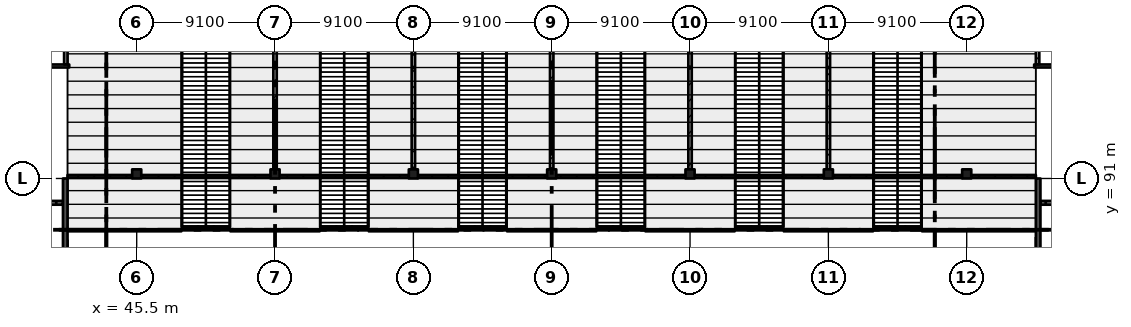
"""IFC4 building model, lengths in metres.
Left out: names, types, materials, properties, quantities, classifications, styles, units other than length and angle.
Written with IfcOpenShell. Run it as: python <this file> out.ifc"""

import sys

from ifc_helpers import new_model, si_unit, direction, frame, frame_2d, origin, origin_2d, place, context, subcontext, project, spatial, rectangle, extrude, element, fill, save


model = new_model("IFC4")
c1 = context("Model", 3, precision=1e-05, world=origin(), true_north=direction((0.0, 1.0)))
c2 = subcontext(c1, "Body", "Model", "MODEL_VIEW")
j1 = project(units=[si_unit("LENGTHUNIT", "METRE"), si_unit("PLANEANGLEUNIT", "RADIAN")], contexts=[c1])
p1 = place(None, origin())
s1 = spatial("IfcSite", under=j1, at=p1, CompositionType="ELEMENT")
p2 = place(p1, origin())
s2 = spatial("IfcBuilding", under=s1, at=p2, CompositionType="ELEMENT")
p3 = place(p2, frame((0.0, 0.0, 15.47)))
s3 = spatial("IfcBuildingStorey", under=s2, at=p3, CompositionType="ELEMENT", Elevation=15.47)
for number, where, z_axis, x_axis in (
    (1, (45.5, 91.3, 0.0), (0.0, 0.0, 1.0), (1.0, 0.0, 0.0)),
    (2, (54.6, 91.3, 0.0), (0.0, 0.0, 1.0), (1.0, 0.0, 0.0)),
    (3, (63.7, 91.3, 0.0), (0.0, 0.0, 1.0), (1.0, 0.0, 0.0)),
    (4, (72.8, 91.3, 0.0), (0.0, 0.0, 1.0), (1.0, 0.0, 0.0)),
    (5, (81.9, 91.3, 0.0), (0.0, 0.0, 1.0), (1.0, 0.0, 0.0)),
    (6, (91.0, 91.3, 0.0), (0.0, 0.0, 1.0), (1.0, 0.0, 0.0)),
    (7, (100.1, 91.3, 0.0), (0.0, 0.0, 1.0), (1.0, 0.0, 0.0)),
):
    element("IfcColumn", number, at=place(p3, frame(where, z_axis=z_axis, x_axis=x_axis)), inside=s3, PredefinedType="COLUMN", context=c2, shape_type="SweptSolid", body=[
        extrude(rectangle(XDim=0.6, YDim=0.6, at=origin_2d()), origin(), (0.0, 0.0, 1.0), 2.71),
    ])
for number, where, z_axis, x_axis in (
    (8, (40.8, 68.25, 0.0), (0.0, 0.0, 1.0), (0.0, 1.0, 0.0)),
    (9, (104.8, 68.25, 0.0), (0.0, 0.0, 1.0), (0.0, 1.0, 0.0)),
):
    element("IfcWall", number, at=place(p3, frame(where, z_axis=z_axis, x_axis=x_axis)), inside=s3, PredefinedType="SHEAR", context=c2, shape_type="SweptSolid", body=[
        extrude(rectangle(XDim=22.75, YDim=0.3, at=frame_2d((11.375, 0.0))), origin(), (0.0, 0.0, 1.0), 4.55),
    ])
p4 = place(p3, frame((36.3, 98.4, 0.0), z_axis=(0.0, 0.0, 1.0), x_axis=(1.0, 0.0, 0.0)))
e10 = element("IfcWall", 10, at=p4, inside=s3, PredefinedType="PARTITIONING", context=c2, shape_type="SweptSolid", body=[
    extrude(rectangle(XDim=4.762, YDim=0.2, at=frame_2d((2.381, 0.0))), origin(), (0.0, 0.0, 1.0), 4.3),
])
p5 = place(p4, frame((1.675, 0.0, 0.0)))
e11 = element("IfcOpeningElement", 11, at=p5, cuts=e10, PredefinedType="OPENING", context=c2, shape_type="SweptSolid", body=[
    extrude(rectangle(XDim=1.8, YDim=2.4, at=frame_2d((0.9, 1.2))), frame((0.0, 0.11, 0.0), z_axis=(0.0, -1.0, 0.0), x_axis=(1.0, 0.0, 0.0)), (0.0, 0.0, 1.0), 0.22),
])
p6 = place(p3, frame((40.65, 89.4, 0.0), z_axis=(0.0, 0.0, 1.0), x_axis=(-1.0, 0.0, 0.0)))
e12 = element("IfcWall", 12, at=p6, inside=s3, PredefinedType="SOLIDWALL", context=c2, shape_type="SweptSolid", body=[
    extrude(rectangle(XDim=3.675, YDim=0.25, at=frame_2d((1.837, 0.0))), origin(), (0.0, 0.0, 1.0), 4.3),
])
p7 = place(p6, frame((1.35, 0.0, 0.0)))
e13 = element("IfcOpeningElement", 13, at=p7, cuts=e12, PredefinedType="OPENING", context=c2, shape_type="SweptSolid", body=[
    extrude(rectangle(XDim=1.0, YDim=2.1, at=frame_2d((0.5, 1.05))), frame((0.0, 0.135, 0.0), z_axis=(0.0, -1.0, 0.0), x_axis=(1.0, 0.0, 0.0)), (0.0, 0.0, 1.0), 0.27),
])
p8 = place(p3, frame((40.836, 100.1, 0.0), z_axis=(0.0, 0.0, 1.0), x_axis=(0.0, -1.0, 0.0)))
e14 = element("IfcWall", 14, at=p8, inside=s3, PredefinedType="PARTITIONING", context=c2, shape_type="SweptSolid", body=[
    extrude(rectangle(XDim=1.6, YDim=0.225, at=frame_2d((0.8, 0.0))), origin(), (0.0, 0.0, 1.0), 4.3),
])
p9 = place(p3, frame((54.6, 98.27, 0.0), z_axis=(0.0, 0.0, 1.0), x_axis=(0.0, -1.0, 0.0)))
e15 = element("IfcWall", 15, at=p9, inside=s3, PredefinedType="PARTITIONING", context=c2, shape_type="SweptSolid", body=[
    extrude(rectangle(XDim=6.67, YDim=0.225, at=frame_2d((3.335, 0.0))), origin(), (0.0, 0.0, 1.0), 3.22),
])
p10 = place(p3, frame((54.6, 99.988, 0.0), z_axis=(0.0, 0.0, 1.0), x_axis=(0.0, -1.0, 0.0)))
e16 = element("IfcWall", 16, at=p10, inside=s3, PredefinedType="PARTITIONING", context=c2, shape_type="SweptSolid", body=[
    extrude(rectangle(XDim=1.657, YDim=0.225, at=frame_2d((0.829, 0.0))), origin(), (0.0, 0.0, 1.0), 3.22),
])
p11 = place(p3, frame((63.7, 98.27, 0.0), z_axis=(0.0, 0.0, 1.0), x_axis=(0.0, -1.0, 0.0)))
e17 = element("IfcWall", 17, at=p11, inside=s3, PredefinedType="PARTITIONING", context=c2, shape_type="SweptSolid", body=[
    extrude(rectangle(XDim=6.67, YDim=0.225, at=frame_2d((3.335, 0.0))), origin(), (0.0, 0.0, 1.0), 3.22),
])
p12 = place(p3, frame((63.7, 99.988, 0.0), z_axis=(0.0, 0.0, 1.0), x_axis=(0.0, -1.0, 0.0)))
e18 = element("IfcWall", 18, at=p12, inside=s3, PredefinedType="PARTITIONING", context=c2, shape_type="SweptSolid", body=[
    extrude(rectangle(XDim=1.657, YDim=0.225, at=frame_2d((0.829, 0.0))), origin(), (0.0, 0.0, 1.0), 3.22),
])
p13 = place(p3, frame((72.8, 98.27, 0.0), z_axis=(0.0, 0.0, 1.0), x_axis=(0.0, -1.0, 0.0)))
e19 = element("IfcWall", 19, at=p13, inside=s3, PredefinedType="PARTITIONING", context=c2, shape_type="SweptSolid", body=[
    extrude(rectangle(XDim=6.67, YDim=0.225, at=frame_2d((3.335, 0.0))), origin(), (0.0, 0.0, 1.0), 3.22),
])
p14 = place(p3, frame((72.8, 99.988, 0.0), z_axis=(0.0, 0.0, 1.0), x_axis=(0.0, -1.0, 0.0)))
e20 = element("IfcWall", 20, at=p14, inside=s3, PredefinedType="PARTITIONING", context=c2, shape_type="SweptSolid", body=[
    extrude(rectangle(XDim=1.657, YDim=0.225, at=frame_2d((0.829, 0.0))), origin(), (0.0, 0.0, 1.0), 3.22),
])
p15 = place(p3, frame((81.9, 98.27, 0.0), z_axis=(0.0, 0.0, 1.0), x_axis=(0.0, -1.0, 0.0)))
e21 = element("IfcWall", 21, at=p15, inside=s3, PredefinedType="PARTITIONING", context=c2, shape_type="SweptSolid", body=[
    extrude(rectangle(XDim=6.67, YDim=0.225, at=frame_2d((3.335, 0.0))), origin(), (0.0, 0.0, 1.0), 3.22),
])
p16 = place(p3, frame((81.9, 99.988, 0.0), z_axis=(0.0, 0.0, 1.0), x_axis=(0.0, -1.0, 0.0)))
e22 = element("IfcWall", 22, at=p16, inside=s3, PredefinedType="PARTITIONING", context=c2, shape_type="SweptSolid", body=[
    extrude(rectangle(XDim=1.657, YDim=0.225, at=frame_2d((0.829, 0.0))), origin(), (0.0, 0.0, 1.0), 3.22),
])
p17 = place(p3, frame((91.0, 98.27, 0.0), z_axis=(0.0, 0.0, 1.0), x_axis=(0.0, -1.0, 0.0)))
e23 = element("IfcWall", 23, at=p17, inside=s3, PredefinedType="PARTITIONING", context=c2, shape_type="SweptSolid", body=[
    extrude(rectangle(XDim=6.67, YDim=0.225, at=frame_2d((3.335, 0.0))), origin(), (0.0, 0.0, 1.0), 3.22),
])
p18 = place(p3, frame((91.0, 99.988, 0.0), z_axis=(0.0, 0.0, 1.0), x_axis=(0.0, -1.0, 0.0)))
e24 = element("IfcWall", 24, at=p18, inside=s3, PredefinedType="PARTITIONING", context=c2, shape_type="SweptSolid", body=[
    extrude(rectangle(XDim=1.657, YDim=0.225, at=frame_2d((0.829, 0.0))), origin(), (0.0, 0.0, 1.0), 3.22),
])
p19 = place(p3, frame((104.538, 98.4, 0.0), z_axis=(0.0, 0.0, 1.0), x_axis=(1.0, 0.0, 0.0)))
e25 = element("IfcWall", 25, at=p19, inside=s3, PredefinedType="PARTITIONING", context=c2, shape_type="SweptSolid", body=[
    extrude(rectangle(XDim=4.762, YDim=0.2, at=frame_2d((2.381, 0.0))), origin(), (0.0, 0.0, 1.0), 4.3),
])
p20 = place(p19, frame((1.25, 0.0, 0.0)))
e26 = element("IfcOpeningElement", 26, at=p20, cuts=e25, PredefinedType="OPENING", context=c2, shape_type="SweptSolid", body=[
    extrude(rectangle(XDim=1.8, YDim=2.4, at=frame_2d((0.9, 1.2))), frame((0.0, 0.11, 0.0), z_axis=(0.0, -1.0, 0.0), x_axis=(1.0, 0.0, 0.0)), (0.0, 0.0, 1.0), 0.22),
])
p21 = place(p3, frame((104.763, 98.5, 0.0), z_axis=(0.0, 0.0, 1.0), x_axis=(0.0, 1.0, 0.0)))
e27 = element("IfcWall", 27, at=p21, inside=s3, PredefinedType="PARTITIONING", context=c2, shape_type="SweptSolid", body=[
    extrude(rectangle(XDim=1.6, YDim=0.225, at=frame_2d((0.8, 0.0))), origin(), (0.0, 0.0, 1.0), 4.3),
])
p22 = place(p3, frame((108.625, 89.4, 0.0), z_axis=(0.0, 0.0, 1.0), x_axis=(-1.0, 0.0, 0.0)))
e28 = element("IfcWall", 28, at=p22, inside=s3, PredefinedType="SOLIDWALL", context=c2, shape_type="SweptSolid", body=[
    extrude(rectangle(XDim=3.675, YDim=0.25, at=frame_2d((1.837, 0.0))), origin(), (0.0, 0.0, 1.0), 4.3),
])
p23 = place(p22, frame((1.45, 0.0, 0.0)))
e29 = element("IfcOpeningElement", 29, at=p23, cuts=e28, PredefinedType="OPENING", context=c2, shape_type="SweptSolid", body=[
    extrude(rectangle(XDim=0.8, YDim=2.1, at=frame_2d((0.4, 1.05))), frame((0.0, 0.135, 0.0), z_axis=(0.0, -1.0, 0.0), x_axis=(1.0, 0.0, 0.0)), (0.0, 0.0, 1.0), 0.27),
])
p24 = place(p3, frame((54.3, 91.13, 0.0), z_axis=(0.0, 0.0, 1.0), x_axis=(-1.0, 0.0, 0.0)))
e30 = element("IfcWall", 30, at=p24, inside=s3, PredefinedType="PARTITIONING", context=c2, shape_type="SweptSolid", body=[
    extrude(rectangle(XDim=8.5, YDim=0.2, at=frame_2d((4.25, 0.0))), origin(), (0.0, 0.0, 1.0), 2.71),
])
p25 = place(p24, frame((1.25, 0.0, 1.1)))
e31 = element("IfcOpeningElement", 31, at=p25, cuts=e30, PredefinedType="OPENING", context=c2, shape_type="SweptSolid", body=[
    extrude(rectangle(XDim=6.0, YDim=1.3, at=frame_2d((3.0, 0.65))), frame((0.0, 0.11, 0.0), z_axis=(0.0, -1.0, 0.0), x_axis=(1.0, 0.0, 0.0)), (0.0, 0.0, 1.0), 0.22),
])
p26 = place(p3, frame((45.2, 91.13, 0.0), z_axis=(0.0, 0.0, 1.0), x_axis=(-1.0, 0.0, 0.0)))
e32 = element("IfcWall", 32, at=p26, inside=s3, PredefinedType="PARTITIONING", context=c2, shape_type="SweptSolid", body=[
    extrude(rectangle(XDim=4.25, YDim=0.2, at=frame_2d((2.125, 0.0))), origin(), (0.0, 0.0, 1.0), 2.91),
])
p27 = place(p26, frame((1.125, 0.0, 1.1)))
e33 = element("IfcOpeningElement", 33, at=p27, cuts=e32, PredefinedType="OPENING", context=c2, shape_type="SweptSolid", body=[
    extrude(rectangle(XDim=2.0, YDim=1.3, at=frame_2d((1.0, 0.65))), frame((0.0, 0.11, 0.0), z_axis=(0.0, -1.0, 0.0), x_axis=(1.0, 0.0, 0.0)), (0.0, 0.0, 1.0), 0.22),
])
p28 = place(p3, frame((63.4, 91.13, 0.0), z_axis=(0.0, 0.0, 1.0), x_axis=(-1.0, 0.0, 0.0)))
e34 = element("IfcWall", 34, at=p28, inside=s3, PredefinedType="PARTITIONING", context=c2, shape_type="SweptSolid", body=[
    extrude(rectangle(XDim=8.5, YDim=0.2, at=frame_2d((4.25, 0.0))), origin(), (0.0, 0.0, 1.0), 2.71),
])
p29 = place(p28, frame((1.25, 0.0, 1.1)))
e35 = element("IfcOpeningElement", 35, at=p29, cuts=e34, PredefinedType="OPENING", context=c2, shape_type="SweptSolid", body=[
    extrude(rectangle(XDim=6.0, YDim=1.3, at=frame_2d((3.0, 0.65))), frame((0.0, 0.11, 0.0), z_axis=(0.0, -1.0, 0.0), x_axis=(1.0, 0.0, 0.0)), (0.0, 0.0, 1.0), 0.22),
])
p30 = place(p3, frame((72.5, 91.13, 0.0), z_axis=(0.0, 0.0, 1.0), x_axis=(-1.0, 0.0, 0.0)))
e36 = element("IfcWall", 36, at=p30, inside=s3, PredefinedType="PARTITIONING", context=c2, shape_type="SweptSolid", body=[
    extrude(rectangle(XDim=8.5, YDim=0.2, at=frame_2d((4.25, 0.0))), origin(), (0.0, 0.0, 1.0), 2.71),
])
p31 = place(p30, frame((1.25, 0.0, 1.1)))
e37 = element("IfcOpeningElement", 37, at=p31, cuts=e36, PredefinedType="OPENING", context=c2, shape_type="SweptSolid", body=[
    extrude(rectangle(XDim=6.0, YDim=1.3, at=frame_2d((3.0, 0.65))), frame((0.0, 0.11, 0.0), z_axis=(0.0, -1.0, 0.0), x_axis=(1.0, 0.0, 0.0)), (0.0, 0.0, 1.0), 0.22),
])
p32 = place(p3, frame((81.6, 91.13, 0.0), z_axis=(0.0, 0.0, 1.0), x_axis=(-1.0, 0.0, 0.0)))
e38 = element("IfcWall", 38, at=p32, inside=s3, PredefinedType="PARTITIONING", context=c2, shape_type="SweptSolid", body=[
    extrude(rectangle(XDim=8.5, YDim=0.2, at=frame_2d((4.25, 0.0))), origin(), (0.0, 0.0, 1.0), 2.71),
])
p33 = place(p32, frame((1.25, 0.0, 1.1)))
e39 = element("IfcOpeningElement", 39, at=p33, cuts=e38, PredefinedType="OPENING", context=c2, shape_type="SweptSolid", body=[
    extrude(rectangle(XDim=6.0, YDim=1.3, at=frame_2d((3.0, 0.65))), frame((0.0, 0.11, 0.0), z_axis=(0.0, -1.0, 0.0), x_axis=(1.0, 0.0, 0.0)), (0.0, 0.0, 1.0), 0.22),
])
p34 = place(p3, frame((90.7, 91.13, 0.0), z_axis=(0.0, 0.0, 1.0), x_axis=(-1.0, 0.0, 0.0)))
e40 = element("IfcWall", 40, at=p34, inside=s3, PredefinedType="PARTITIONING", context=c2, shape_type="SweptSolid", body=[
    extrude(rectangle(XDim=8.5, YDim=0.2, at=frame_2d((4.25, 0.0))), origin(), (0.0, 0.0, 1.0), 2.71),
])
p35 = place(p34, frame((1.25, 0.0, 1.1)))
e41 = element("IfcOpeningElement", 41, at=p35, cuts=e40, PredefinedType="OPENING", context=c2, shape_type="SweptSolid", body=[
    extrude(rectangle(XDim=6.0, YDim=1.3, at=frame_2d((3.0, 0.65))), frame((0.0, 0.11, 0.0), z_axis=(0.0, -1.0, 0.0), x_axis=(1.0, 0.0, 0.0)), (0.0, 0.0, 1.0), 0.22),
])
p36 = place(p3, frame((104.65, 91.13, 0.0), z_axis=(0.0, 0.0, 1.0), x_axis=(-1.0, 0.0, 0.0)))
e42 = element("IfcWall", 42, at=p36, inside=s3, PredefinedType="PARTITIONING", context=c2, shape_type="SweptSolid", body=[
    extrude(rectangle(XDim=4.25, YDim=0.2, at=frame_2d((2.125, 0.0))), origin(), (0.0, 0.0, 1.0), 2.91),
])
p37 = place(p36, frame((1.125, 0.0, 1.1)))
e43 = element("IfcOpeningElement", 43, at=p37, cuts=e42, PredefinedType="OPENING", context=c2, shape_type="SweptSolid", body=[
    extrude(rectangle(XDim=2.0, YDim=1.3, at=frame_2d((1.0, 0.65))), frame((0.0, 0.11, 0.0), z_axis=(0.0, -1.0, 0.0), x_axis=(1.0, 0.0, 0.0)), (0.0, 0.0, 1.0), 0.22),
])
p38 = place(p3, frame((99.8, 91.13, 0.0), z_axis=(0.0, 0.0, 1.0), x_axis=(-1.0, 0.0, 0.0)))
e44 = element("IfcWall", 44, at=p38, inside=s3, PredefinedType="PARTITIONING", context=c2, shape_type="SweptSolid", body=[
    extrude(rectangle(XDim=8.5, YDim=0.2, at=frame_2d((4.25, 0.0))), origin(), (0.0, 0.0, 1.0), 2.71),
])
p39 = place(p38, frame((1.25, 0.0, 1.1)))
e45 = element("IfcOpeningElement", 45, at=p39, cuts=e44, PredefinedType="OPENING", context=c2, shape_type="SweptSolid", body=[
    extrude(rectangle(XDim=6.0, YDim=1.3, at=frame_2d((3.0, 0.65))), frame((0.0, 0.11, 0.0), z_axis=(0.0, -1.0, 0.0), x_axis=(1.0, 0.0, 0.0)), (0.0, 0.0, 1.0), 0.22),
])
p40 = place(p25, origin())
e46 = element("IfcWindow", 46, at=p40, inside=s3, PartitioningType="SINGLE_PANEL", PredefinedType="WINDOW", context=c2, shape_type="SweptSolid", body=[
    extrude(rectangle(XDim=6.0, YDim=1.3, at=frame_2d((3.0, 0.65))), frame((0.0, 0.03, 0.0), z_axis=(0.0, -1.0, 0.0), x_axis=(1.0, 0.0, 0.0)), (0.0, 0.0, 1.0), 0.06),
])
fill(e31, e46)
p41 = place(p27, origin())
e47 = element("IfcWindow", 47, at=p41, inside=s3, PartitioningType="SINGLE_PANEL", PredefinedType="WINDOW", context=c2, shape_type="SweptSolid", body=[
    extrude(rectangle(XDim=2.0, YDim=1.3, at=frame_2d((1.0, 0.65))), frame((0.0, 0.03, 0.0), z_axis=(0.0, -1.0, 0.0), x_axis=(1.0, 0.0, 0.0)), (0.0, 0.0, 1.0), 0.06),
])
fill(e33, e47)
p42 = place(p29, origin())
e48 = element("IfcWindow", 48, at=p42, inside=s3, PartitioningType="SINGLE_PANEL", PredefinedType="WINDOW", context=c2, shape_type="SweptSolid", body=[
    extrude(rectangle(XDim=6.0, YDim=1.3, at=frame_2d((3.0, 0.65))), frame((0.0, 0.03, 0.0), z_axis=(0.0, -1.0, 0.0), x_axis=(1.0, 0.0, 0.0)), (0.0, 0.0, 1.0), 0.06),
])
fill(e35, e48)
p43 = place(p31, origin())
e49 = element("IfcWindow", 49, at=p43, inside=s3, PartitioningType="SINGLE_PANEL", PredefinedType="WINDOW", context=c2, shape_type="SweptSolid", body=[
    extrude(rectangle(XDim=6.0, YDim=1.3, at=frame_2d((3.0, 0.65))), frame((0.0, 0.03, 0.0), z_axis=(0.0, -1.0, 0.0), x_axis=(1.0, 0.0, 0.0)), (0.0, 0.0, 1.0), 0.06),
])
fill(e37, e49)
p44 = place(p33, origin())
e50 = element("IfcWindow", 50, at=p44, inside=s3, PartitioningType="SINGLE_PANEL", PredefinedType="WINDOW", context=c2, shape_type="SweptSolid", body=[
    extrude(rectangle(XDim=6.0, YDim=1.3, at=frame_2d((3.0, 0.65))), frame((0.0, 0.03, 0.0), z_axis=(0.0, -1.0, 0.0), x_axis=(1.0, 0.0, 0.0)), (0.0, 0.0, 1.0), 0.06),
])
fill(e39, e50)
p45 = place(p35, origin())
e51 = element("IfcWindow", 51, at=p45, inside=s3, PartitioningType="SINGLE_PANEL", PredefinedType="WINDOW", context=c2, shape_type="SweptSolid", body=[
    extrude(rectangle(XDim=6.0, YDim=1.3, at=frame_2d((3.0, 0.65))), frame((0.0, 0.03, 0.0), z_axis=(0.0, -1.0, 0.0), x_axis=(1.0, 0.0, 0.0)), (0.0, 0.0, 1.0), 0.06),
])
fill(e41, e51)
p46 = place(p37, origin())
e52 = element("IfcWindow", 52, at=p46, inside=s3, PartitioningType="SINGLE_PANEL", PredefinedType="WINDOW", context=c2, shape_type="SweptSolid", body=[
    extrude(rectangle(XDim=2.0, YDim=1.3, at=frame_2d((1.0, 0.65))), frame((0.0, 0.03, 0.0), z_axis=(0.0, -1.0, 0.0), x_axis=(1.0, 0.0, 0.0)), (0.0, 0.0, 1.0), 0.06),
])
fill(e43, e52)
p47 = place(p39, origin())
e53 = element("IfcWindow", 53, at=p47, inside=s3, PartitioningType="SINGLE_PANEL", PredefinedType="WINDOW", context=c2, shape_type="SweptSolid", body=[
    extrude(rectangle(XDim=6.0, YDim=1.3, at=frame_2d((3.0, 0.65))), frame((0.0, 0.03, 0.0), z_axis=(0.0, -1.0, 0.0), x_axis=(1.0, 0.0, 0.0)), (0.0, 0.0, 1.0), 0.06),
])
fill(e45, e53)
save(model, sys.argv[1])
